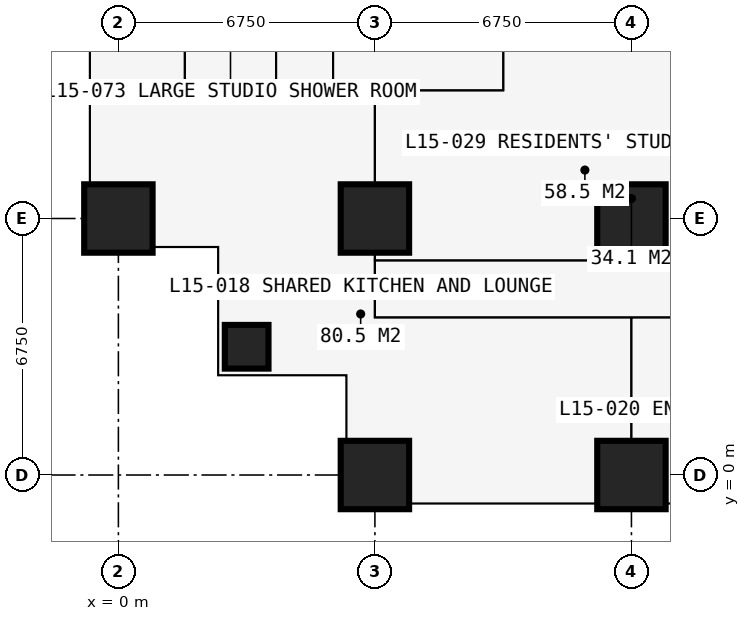
"""IFC4 building model, lengths in metres.
Left out: names, types, materials, properties, quantities, classifications, styles, units other than length and angle.
Written with IfcOpenShell. Run it as: python <this file> out.ifc"""

import sys

from ifc_helpers import new_model, si_unit, direction, frame, frame_2d, origin, origin_2d, place, context, subcontext, project, spatial, rectangle, extrude, element, fill, save


model = new_model("IFC4")
c1 = context("Model", 3, precision=1e-05, world=origin(), true_north=direction((0.0, 1.0)))
c2 = subcontext(c1, "Body", "Model", "MODEL_VIEW")
j1 = project(units=[si_unit("LENGTHUNIT", "METRE"), si_unit("PLANEANGLEUNIT", "RADIAN")], contexts=[c1])
p1 = place(None, origin())
s1 = spatial("IfcSite", under=j1, at=p1, CompositionType="ELEMENT")
p2 = place(p1, origin())
s2 = spatial("IfcBuilding", under=s1, at=p2, CompositionType="ELEMENT")
p3 = place(p2, frame((0.0, 0.0, 57.6)))
s3 = spatial("IfcBuildingStorey", under=s2, at=p3, CompositionType="ELEMENT", Elevation=57.6)
p4 = place(p3, frame((0.0, 6.75, 0.0), z_axis=(0.0, 0.0, 1.0), x_axis=(1.0, 0.0, 0.0)))
e1 = element("IfcColumn", 1, at=p4, inside=s3, PredefinedType="COLUMN", context=c2, shape_type="SweptSolid", body=[
    extrude(rectangle(XDim=1.8, YDim=1.8, at=origin_2d()), origin(), (0.0, 0.0, 1.0), 3.6),
])
p5 = place(p3, frame((3.375, 3.375, 0.0), z_axis=(0.0, 0.0, 1.0), x_axis=(1.0, 0.0, 0.0)))
e2 = element("IfcColumn", 2, at=p5, inside=s3, PredefinedType="COLUMN", context=c2, shape_type="SweptSolid", body=[
    extrude(rectangle(XDim=1.15, YDim=1.15, at=origin_2d()), origin(), (0.0, 0.0, 1.0), 3.6),
])
for number, where, z_axis, x_axis in (
    (3, (6.75, 0.0, 0.0), (0.0, 0.0, 1.0), (1.0, 0.0, 0.0)),
    (4, (6.75, 6.75, 0.0), (0.0, 0.0, 1.0), (1.0, 0.0, 0.0)),
    (5, (13.5, 0.0, 0.0), (0.0, 0.0, 1.0), (1.0, 0.0, 0.0)),
    (6, (13.5, 6.75, 0.0), (0.0, 0.0, 1.0), (1.0, 0.0, 0.0)),
):
    element("IfcColumn", number, at=place(p3, frame(where, z_axis=z_axis, x_axis=x_axis)), inside=s3, PredefinedType="COLUMN", context=c2, shape_type="SweptSolid", body=[
        extrude(rectangle(XDim=1.8, YDim=1.8, at=origin_2d()), origin(), (0.0, 0.0, 1.0), 3.6),
    ])
p6 = place(p3, frame((-0.75, 6.0, 0.0), z_axis=(0.0, 0.0, 1.0), x_axis=(1.0, 0.0, 0.0)))
e7 = element("IfcWall", 7, at=p6, inside=s3, PredefinedType="SOLIDWALL", context=c2, shape_type="SweptSolid", body=[
    extrude(rectangle(XDim=3.375, YDim=0.3, at=frame_2d((1.688, 0.0))), origin(), (0.0, 0.0, 1.0), 3.375),
])
p7 = place(p6, frame((1.833, 0.0, 0.9)))
e8 = element("IfcOpeningElement", 8, at=p7, cuts=e7, PredefinedType="OPENING", context=c2, shape_type="SweptSolid", body=[
    extrude(rectangle(XDim=1.2, YDim=1.8, at=frame_2d((0.6, 0.9))), frame((0.0, 0.16, 0.0), z_axis=(0.0, -1.0, 0.0), x_axis=(1.0, 0.0, 0.0)), (0.0, 0.0, 1.0), 0.32),
])
p8 = place(p3, frame((2.625, 6.0, 0.0), z_axis=(0.0, 0.0, 1.0), x_axis=(0.0, -1.0, 0.0)))
e9 = element("IfcWall", 9, at=p8, inside=s3, PredefinedType="SOLIDWALL", context=c2, shape_type="SweptSolid", body=[
    extrude(rectangle(XDim=3.375, YDim=0.3, at=frame_2d((1.688, 0.0))), origin(), (0.0, 0.0, 1.0), 3.375),
])
p9 = place(p8, frame((0.788, 0.0, 0.6)))
e10 = element("IfcOpeningElement", 10, at=p9, cuts=e9, PredefinedType="OPENING", context=c2, shape_type="SweptSolid", body=[
    extrude(rectangle(XDim=1.8, YDim=2.1, at=frame_2d((0.9, 1.05))), frame((0.0, 0.16, 0.0), z_axis=(0.0, -1.0, 0.0), x_axis=(1.0, 0.0, 0.0)), (0.0, 0.0, 1.0), 0.32),
])
p10 = place(p3, frame((2.625, 2.625, 0.0), z_axis=(0.0, 0.0, 1.0), x_axis=(1.0, 0.0, 0.0)))
e11 = element("IfcWall", 11, at=p10, inside=s3, PredefinedType="SOLIDWALL", context=c2, shape_type="SweptSolid", body=[
    extrude(rectangle(XDim=3.375, YDim=0.3, at=frame_2d((1.688, 0.0))), origin(), (0.0, 0.0, 1.0), 3.375),
])
p11 = place(p10, frame((0.788, 0.0, 0.6)))
e12 = element("IfcOpeningElement", 12, at=p11, cuts=e11, PredefinedType="OPENING", context=c2, shape_type="SweptSolid", body=[
    extrude(rectangle(XDim=1.8, YDim=2.1, at=frame_2d((0.9, 1.05))), frame((0.0, 0.16, 0.0), z_axis=(0.0, -1.0, 0.0), x_axis=(1.0, 0.0, 0.0)), (0.0, 0.0, 1.0), 0.32),
])
p12 = place(p3, frame((6.0, 2.625, 0.0), z_axis=(0.0, 0.0, 1.0), x_axis=(0.0, -1.0, 0.0)))
e13 = element("IfcWall", 13, at=p12, inside=s3, PredefinedType="SOLIDWALL", context=c2, shape_type="SweptSolid", body=[
    extrude(rectangle(XDim=3.375, YDim=0.3, at=frame_2d((1.688, 0.0))), origin(), (0.0, 0.0, 1.0), 3.375),
])
p13 = place(p12, frame((0.343, 0.0, 0.9)))
e14 = element("IfcOpeningElement", 14, at=p13, cuts=e13, PredefinedType="OPENING", context=c2, shape_type="SweptSolid", body=[
    extrude(rectangle(XDim=1.2, YDim=1.8, at=frame_2d((0.6, 0.9))), frame((0.0, 0.16, 0.0), z_axis=(0.0, -1.0, 0.0), x_axis=(1.0, 0.0, 0.0)), (0.0, 0.0, 1.0), 0.32),
])
p14 = place(p3, frame((-0.734, 10.125, 0.0), z_axis=(0.0, 0.0, 1.0), x_axis=(1.0, 0.0, 0.0)))
e15 = element("IfcWall", 15, at=p14, inside=s3, PredefinedType="PARTITIONING", context=c2, shape_type="SweptSolid", body=[
    extrude(rectangle(XDim=10.859, YDim=0.15, at=frame_2d((5.429, 0.0))), origin(), (0.0, 0.0, 1.0), 3.375),
])
p15 = place(p3, frame((1.75, 10.125, 0.0), z_axis=(0.0, 0.0, 1.0), x_axis=(0.0, 1.0, 0.0)))
e16 = element("IfcWall", 16, at=p15, inside=s3, PredefinedType="PARTITIONING", context=c2, shape_type="SweptSolid", body=[
    extrude(rectangle(XDim=2.6, YDim=0.1, at=frame_2d((1.3, 0.0))), origin(), (0.0, 0.0, 1.0), 3.375),
])
p16 = place(p15, frame((0.85, 0.0, 0.0)))
e17 = element("IfcOpeningElement", 17, at=p16, cuts=e16, PredefinedType="OPENING", context=c2, shape_type="SweptSolid", body=[
    extrude(rectangle(XDim=0.9, YDim=2.2, at=frame_2d((0.45, 1.1))), frame((0.0, 0.06, 0.0), z_axis=(0.0, -1.0, 0.0), x_axis=(1.0, 0.0, 0.0)), (0.0, 0.0, 1.0), 0.12),
])
p17 = place(p3, frame((4.15, 10.125, 0.0), z_axis=(0.0, 0.0, 1.0), x_axis=(0.0, 1.0, 0.0)))
e18 = element("IfcWall", 18, at=p17, inside=s3, PredefinedType="PARTITIONING", context=c2, shape_type="SweptSolid", body=[
    extrude(rectangle(XDim=23.625, YDim=0.15, at=frame_2d((11.812, 0.0))), origin(), (0.0, 0.0, 1.0), 3.375),
])
p18 = place(p17, frame((19.775, 0.0, 0.0)))
e19 = element("IfcOpeningElement", 19, at=p18, cuts=e18, PredefinedType="OPENING", context=c2, shape_type="SweptSolid", body=[
    extrude(rectangle(XDim=1.0, YDim=2.2, at=frame_2d((0.5, 1.1))), frame((0.0, 0.085, 0.0), z_axis=(0.0, -1.0, 0.0), x_axis=(1.0, 0.0, 0.0)), (0.0, 0.0, 1.0), 0.17),
])
p19 = place(p17, frame((13.7, 0.0, 0.0)))
e20 = element("IfcOpeningElement", 20, at=p19, cuts=e18, PredefinedType="OPENING", context=c2, shape_type="SweptSolid", body=[
    extrude(rectangle(XDim=0.95, YDim=2.2, at=frame_2d((0.475, 1.1))), frame((0.0, 0.085, 0.0), z_axis=(0.0, -1.0, 0.0), x_axis=(1.0, 0.0, 0.0)), (0.0, 0.0, 1.0), 0.17),
])
p20 = place(p17, frame((4.2, 0.0, 0.0)))
e21 = element("IfcOpeningElement", 21, at=p20, cuts=e18, PredefinedType="OPENING", context=c2, shape_type="SweptSolid", body=[
    extrude(rectangle(XDim=0.95, YDim=2.2, at=frame_2d((0.475, 1.1))), frame((0.0, 0.085, 0.0), z_axis=(0.0, -1.0, 0.0), x_axis=(1.0, 0.0, 0.0)), (0.0, 0.0, 1.0), 0.17),
])
p21 = place(p17, frame((10.95, 0.0, 0.0)))
e22 = element("IfcOpeningElement", 22, at=p21, cuts=e18, PredefinedType="OPENING", context=c2, shape_type="SweptSolid", body=[
    extrude(rectangle(XDim=0.95, YDim=2.2, at=frame_2d((0.475, 1.1))), frame((0.0, 0.085, 0.0), z_axis=(0.0, -1.0, 0.0), x_axis=(1.0, 0.0, 0.0)), (0.0, 0.0, 1.0), 0.17),
])
p22 = place(p3, frame((5.65, 10.125, 0.0), z_axis=(0.0, 0.0, 1.0), x_axis=(0.0, 1.0, 0.0)))
e23 = element("IfcWall", 23, at=p22, inside=s3, PredefinedType="PARTITIONING", context=c2, shape_type="SweptSolid", body=[
    extrude(rectangle(XDim=10.762, YDim=0.15, at=frame_2d((5.381, 0.0))), origin(), (0.0, 0.0, 1.0), 3.375),
])
p23 = place(p22, frame((4.9, 0.0, 0.0)))
e24 = element("IfcOpeningElement", 24, at=p23, cuts=e23, PredefinedType="OPENING", context=c2, shape_type="SweptSolid", body=[
    extrude(rectangle(XDim=0.95, YDim=2.2, at=frame_2d((0.475, 1.1))), frame((0.0, 0.085, 0.0), z_axis=(0.0, -1.0, 0.0), x_axis=(1.0, 0.0, 0.0)), (0.0, 0.0, 1.0), 0.17),
])
p24 = place(p3, frame((6.75, 4.15, 0.0), z_axis=(0.0, 0.0, 1.0), x_axis=(0.0, 1.0, 0.0)))
e25 = element("IfcWall", 25, at=p24, inside=s3, PredefinedType="PARTITIONING", context=c2, shape_type="SweptSolid", body=[
    extrude(rectangle(XDim=5.975, YDim=0.15, at=frame_2d((2.988, 0.0))), origin(), (0.0, 0.0, 1.0), 2.877),
])
p25 = place(p3, frame((6.75, 4.15, 0.0), z_axis=(0.0, 0.0, 1.0), x_axis=(1.0, 0.0, 0.0)))
e26 = element("IfcWall", 26, at=p25, inside=s3, PredefinedType="PARTITIONING", context=c2, shape_type="SweptSolid", body=[
    extrude(rectangle(XDim=23.625, YDim=0.1, at=frame_2d((11.812, 0.0))), origin(), (0.0, 0.0, 1.0), 3.375),
])
p26 = place(p25, frame((2.85, 0.0, 0.0)))
e27 = element("IfcOpeningElement", 27, at=p26, cuts=e26, PredefinedType="OPENING", context=c2, shape_type="SweptSolid", body=[
    extrude(rectangle(XDim=1.0, YDim=2.2, at=frame_2d((0.5, 1.1))), frame((0.0, 0.06, 0.0), z_axis=(0.0, -1.0, 0.0), x_axis=(1.0, 0.0, 0.0)), (0.0, 0.0, 1.0), 0.12),
])
p27 = place(p25, frame((6.95, 0.0, 0.0)))
e28 = element("IfcOpeningElement", 28, at=p27, cuts=e26, PredefinedType="OPENING", context=c2, shape_type="SweptSolid", body=[
    extrude(rectangle(XDim=0.95, YDim=2.2, at=frame_2d((0.475, 1.1))), frame((0.0, 0.06, 0.0), z_axis=(0.0, -1.0, 0.0), x_axis=(1.0, 0.0, 0.0)), (0.0, 0.0, 1.0), 0.12),
])
p28 = place(p25, frame((10.375, 0.0, 0.0)))
e29 = element("IfcOpeningElement", 29, at=p28, cuts=e26, PredefinedType="OPENING", context=c2, shape_type="SweptSolid", body=[
    extrude(rectangle(XDim=0.95, YDim=2.2, at=frame_2d((0.475, 1.1))), frame((0.0, 0.06, 0.0), z_axis=(0.0, -1.0, 0.0), x_axis=(1.0, 0.0, 0.0)), (0.0, 0.0, 1.0), 0.12),
])
p29 = place(p25, frame((18.475, 0.0, 0.0)))
e30 = element("IfcOpeningElement", 30, at=p29, cuts=e26, PredefinedType="OPENING", context=c2, shape_type="SweptSolid", body=[
    extrude(rectangle(XDim=0.95, YDim=2.2, at=frame_2d((0.475, 1.1))), frame((0.0, 0.06, 0.0), z_axis=(0.0, -1.0, 0.0), x_axis=(1.0, 0.0, 0.0)), (0.0, 0.0, 1.0), 0.12),
])
p30 = place(p25, frame((13.7, 0.0, 0.0)))
e31 = element("IfcOpeningElement", 31, at=p30, cuts=e26, PredefinedType="OPENING", context=c2, shape_type="SweptSolid", body=[
    extrude(rectangle(XDim=0.95, YDim=2.2, at=frame_2d((0.475, 1.1))), frame((0.0, 0.06, 0.0), z_axis=(0.0, -1.0, 0.0), x_axis=(1.0, 0.0, 0.0)), (0.0, 0.0, 1.0), 0.12),
])
p31 = place(p3, frame((6.75, 5.65, 0.0), z_axis=(0.0, 0.0, 1.0), x_axis=(1.0, 0.0, 0.0)))
e32 = element("IfcWall", 32, at=p31, inside=s3, PredefinedType="PARTITIONING", context=c2, shape_type="SweptSolid", body=[
    extrude(rectangle(XDim=11.05, YDim=0.15, at=frame_2d((5.525, 0.0))), origin(), (0.0, 0.0, 1.0), 3.375),
])
p32 = place(p3, frame((10.125, 10.125, 0.0), z_axis=(0.0, 0.0, 1.0), x_axis=(0.0, 1.0, 0.0)))
e33 = element("IfcWall", 33, at=p32, inside=s3, PredefinedType="PARTITIONING", context=c2, shape_type="SweptSolid", body=[
    extrude(rectangle(XDim=1.175, YDim=0.15, at=frame_2d((0.587, 0.0))), origin(), (0.0, 0.0, 1.0), 3.375),
])
p33 = place(p3, frame((13.5, -0.734, 0.0), z_axis=(0.0, 0.0, 1.0), x_axis=(0.0, 1.0, 0.0)))
e34 = element("IfcWall", 34, at=p33, inside=s3, PredefinedType="PARTITIONING", context=c2, shape_type="SweptSolid", body=[
    extrude(rectangle(XDim=4.884, YDim=0.15, at=frame_2d((2.442, 0.0))), origin(), (0.0, 0.0, 1.0), 2.61),
])
p34 = place(p7, origin())
e35 = element("IfcWindow", 35, at=p34, inside=s3, PartitioningType="SINGLE_PANEL", PredefinedType="WINDOW", context=c2, shape_type="SweptSolid", body=[
    extrude(rectangle(XDim=1.2, YDim=1.8, at=frame_2d((0.6, 0.9))), frame((0.0, 0.03, 0.0), z_axis=(0.0, -1.0, 0.0), x_axis=(1.0, 0.0, 0.0)), (0.0, 0.0, 1.0), 0.06),
])
fill(e8, e35)
p35 = place(p9, origin())
e36 = element("IfcWindow", 36, at=p35, inside=s3, PartitioningType="SINGLE_PANEL", PredefinedType="WINDOW", context=c2, shape_type="SweptSolid", body=[
    extrude(rectangle(XDim=1.8, YDim=2.1, at=frame_2d((0.9, 1.05))), frame((0.0, 0.03, 0.0), z_axis=(0.0, -1.0, 0.0), x_axis=(1.0, 0.0, 0.0)), (0.0, 0.0, 1.0), 0.06),
])
fill(e10, e36)
p36 = place(p11, origin())
e37 = element("IfcWindow", 37, at=p36, inside=s3, PartitioningType="SINGLE_PANEL", PredefinedType="WINDOW", context=c2, shape_type="SweptSolid", body=[
    extrude(rectangle(XDim=1.8, YDim=2.1, at=frame_2d((0.9, 1.05))), frame((0.0, 0.03, 0.0), z_axis=(0.0, -1.0, 0.0), x_axis=(1.0, 0.0, 0.0)), (0.0, 0.0, 1.0), 0.06),
])
fill(e12, e37)
p37 = place(p13, origin())
e38 = element("IfcWindow", 38, at=p37, inside=s3, PartitioningType="SINGLE_PANEL", PredefinedType="WINDOW", context=c2, shape_type="SweptSolid", body=[
    extrude(rectangle(XDim=1.2, YDim=1.8, at=frame_2d((0.6, 0.9))), frame((0.0, 0.03, 0.0), z_axis=(0.0, -1.0, 0.0), x_axis=(1.0, 0.0, 0.0)), (0.0, 0.0, 1.0), 0.06),
])
fill(e14, e38)
p38 = place(p26, origin())
e39 = element("IfcDoor", 39, at=p38, inside=s3, OperationType="SINGLE_SWING_LEFT", PredefinedType="DOOR", context=c2, shape_type="SweptSolid", body=[
    extrude(rectangle(XDim=1.0, YDim=2.2, at=frame_2d((0.5, 1.1))), frame((0.0, 0.025, 0.0), z_axis=(0.0, -1.0, 0.0), x_axis=(1.0, 0.0, 0.0)), (0.0, 0.0, 1.0), 0.05),
])
fill(e27, e39)
p39 = place(p27, origin())
e40 = element("IfcDoor", 40, at=p39, inside=s3, OperationType="SINGLE_SWING_LEFT", PredefinedType="DOOR", context=c2, shape_type="SweptSolid", body=[
    extrude(rectangle(XDim=0.95, YDim=2.2, at=frame_2d((0.475, 1.1))), frame((0.0, 0.025, 0.0), z_axis=(0.0, -1.0, 0.0), x_axis=(1.0, 0.0, 0.0)), (0.0, 0.0, 1.0), 0.05),
])
fill(e28, e40)
p40 = place(p16, origin())
e41 = element("IfcDoor", 41, at=p40, inside=s3, OperationType="SINGLE_SWING_RIGHT", PredefinedType="DOOR", context=c2, shape_type="SweptSolid", body=[
    extrude(rectangle(XDim=0.9, YDim=2.2, at=frame_2d((0.45, 1.1))), frame((0.0, 0.025, 0.0), z_axis=(0.0, -1.0, 0.0), x_axis=(1.0, 0.0, 0.0)), (0.0, 0.0, 1.0), 0.05),
])
fill(e17, e41)
save(model, sys.argv[1])
